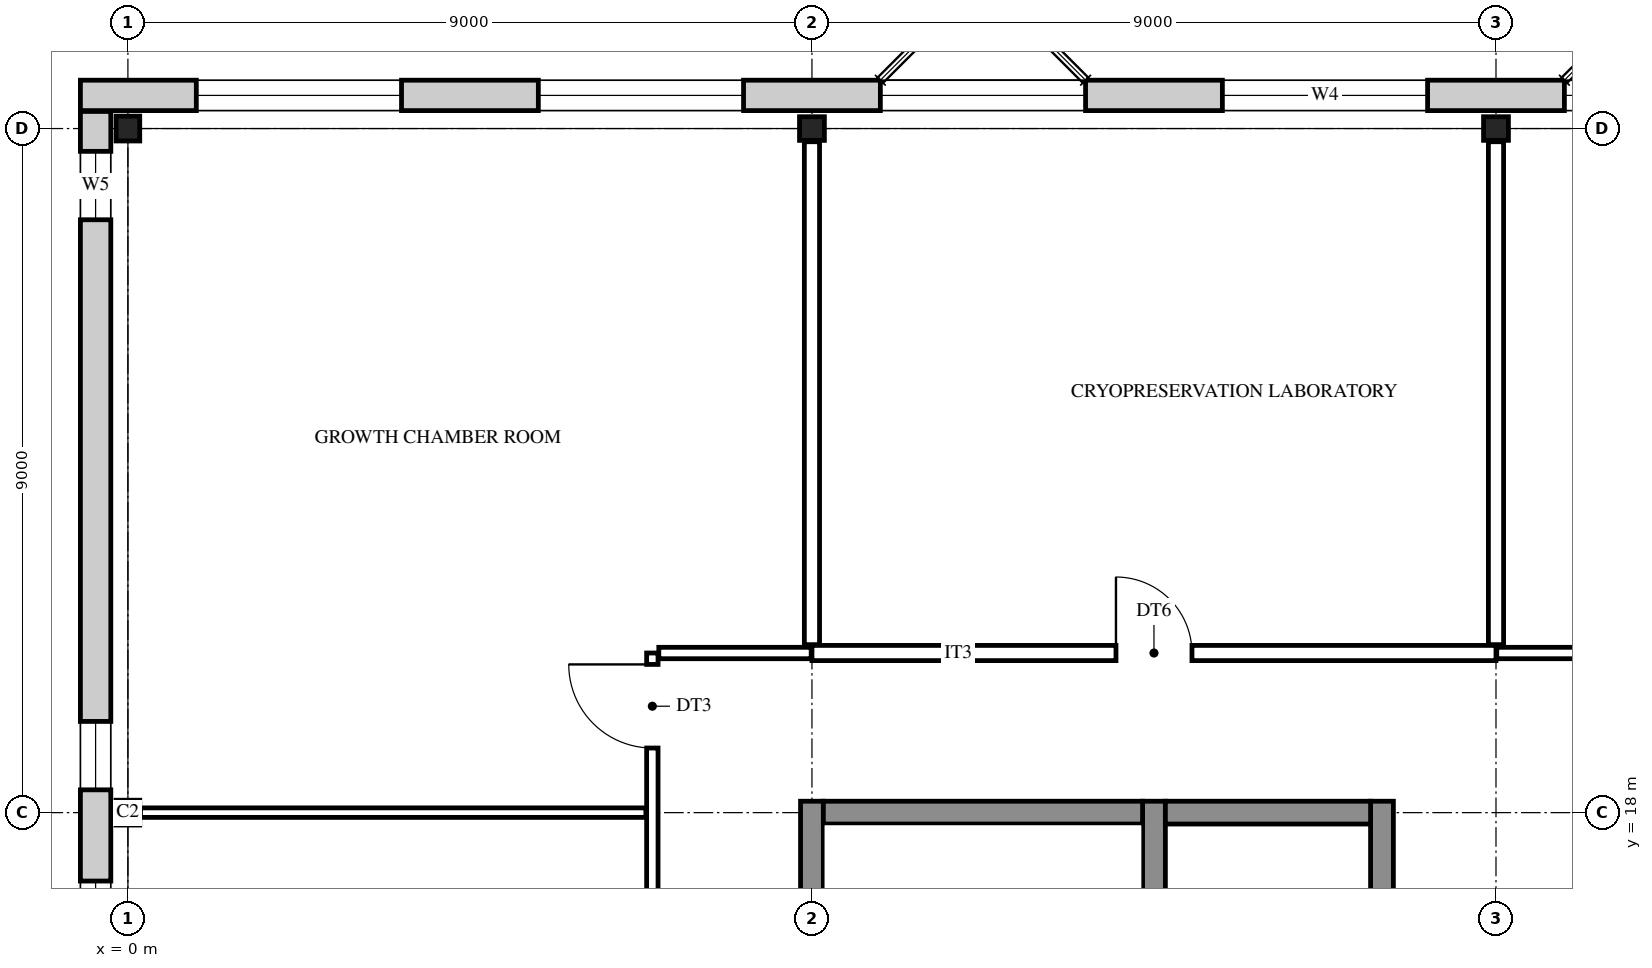
"""IFC4 building model, lengths in metres.
Left out: names, types, materials, properties, quantities, classifications, styles, units other than length and angle.
Written with IfcOpenShell. Run it as: python <this file> out.ifc"""

import sys

from ifc_helpers import new_model, si_unit, direction, frame, frame_2d, origin, origin_2d, place, context, subcontext, project, spatial, rectangle, i_section, extrude, element, fill, save


model = new_model("IFC4")
c1 = context("Model", 3, precision=1e-05, world=origin(), true_north=direction((0.0, 1.0)))
c2 = subcontext(c1, "Body", "Model", "MODEL_VIEW")
j1 = project(units=[si_unit("LENGTHUNIT", "METRE"), si_unit("PLANEANGLEUNIT", "RADIAN")], contexts=[c1])
p1 = place(None, origin())
s1 = spatial("IfcSite", under=j1, at=p1, CompositionType="ELEMENT")
p2 = place(p1, origin())
s2 = spatial("IfcBuilding", under=s1, at=p2, CompositionType="ELEMENT")
p3 = place(p2, frame((0.0, 0.0, 23.4)))
s3 = spatial("IfcBuildingStorey", under=s2, at=p3, CompositionType="ELEMENT", Elevation=23.4)
for number, where, z_axis, x_axis in (
    (1, (0.0, 18.0, 0.0), (0.0, 0.0, 1.0), (1.0, 0.0, 0.0)),
    (2, (0.0, 27.0, 0.0), (0.0, 0.0, 1.0), (1.0, 0.0, 0.0)),
    (3, (9.0, 27.0, 0.0), (0.0, 0.0, 1.0), (0.0, 1.0, 0.0)),
    (4, (18.0, 27.0, 0.0), (0.0, 0.0, 1.0), (0.0, 1.0, 0.0)),
):
    element("IfcColumn", number, at=place(p3, frame(where, z_axis=z_axis, x_axis=x_axis)), inside=s3, PredefinedType="COLUMN", context=c2, shape_type="SweptSolid", body=[
        extrude(i_section(OverallWidth=0.311, OverallDepth=0.327, WebThickness=0.016, FlangeThickness=0.025, FilletRadius=0.017, at=origin_2d()), origin(), (0.0, 0.0, 1.0), 4.2),
    ])
for number, where, z_axis, x_axis in (
    (5, (9.0, 8.85, 0.0), (0.0, 0.0, 1.0), (0.0, 1.0, 0.0)),
    (6, (13.5, 8.85, 0.0), (0.0, 0.0, 1.0), (0.0, 1.0, 0.0)),
):
    element("IfcWall", number, at=place(p3, frame(where, z_axis=z_axis, x_axis=x_axis)), inside=s3, PredefinedType="SHEAR", context=c2, shape_type="SweptSolid", body=[
        extrude(rectangle(XDim=9.3, YDim=0.3, at=frame_2d((4.65, 0.0))), origin(), (0.0, 0.0, 1.0), 4.2),
    ])
p4 = place(p3, frame((16.5, 8.85, 0.0), z_axis=(0.0, 0.0, 1.0), x_axis=(0.0, 1.0, 0.0)))
e7 = element("IfcWall", 7, at=p4, inside=s3, PredefinedType="SHEAR", context=c2, shape_type="SweptSolid", body=[
    extrude(rectangle(XDim=9.3, YDim=0.3, at=frame_2d((4.65, 0.0))), origin(), (0.0, 0.0, 1.0), 4.2),
])
p5 = place(p4, frame((1.1, 0.0, 0.0)))
e8 = element("IfcOpeningElement", 8, at=p5, cuts=e7, PredefinedType="OPENING", context=c2, shape_type="SweptSolid", body=[
    extrude(rectangle(XDim=1.1, YDim=2.1, at=frame_2d((0.55, 1.05))), frame((0.0, 0.16, 0.0), z_axis=(0.0, -1.0, 0.0), x_axis=(1.0, 0.0, 0.0)), (0.0, 0.0, 1.0), 0.32),
])
p6 = place(p4, frame((4.1, 0.0, 0.0)))
e9 = element("IfcOpeningElement", 9, at=p6, cuts=e7, PredefinedType="OPENING", context=c2, shape_type="SweptSolid", body=[
    extrude(rectangle(XDim=1.1, YDim=2.1, at=frame_2d((0.55, 1.05))), frame((0.0, 0.16, 0.0), z_axis=(0.0, -1.0, 0.0), x_axis=(1.0, 0.0, 0.0)), (0.0, 0.0, 1.0), 0.32),
])
p7 = place(p3, frame((9.15, 18.0, 0.0), z_axis=(0.0, 0.0, 1.0), x_axis=(1.0, 0.0, 0.0)))
e10 = element("IfcWall", 10, at=p7, inside=s3, PredefinedType="SHEAR", context=c2, shape_type="SweptSolid", body=[
    extrude(rectangle(XDim=4.2, YDim=0.3, at=frame_2d((2.1, 0.0))), origin(), (0.0, 0.0, 1.0), 4.2),
])
p8 = place(p3, frame((13.65, 18.0, 0.0), z_axis=(0.0, 0.0, 1.0), x_axis=(1.0, 0.0, 0.0)))
e11 = element("IfcWall", 11, at=p8, inside=s3, PredefinedType="SHEAR", context=c2, shape_type="SweptSolid", body=[
    extrude(rectangle(XDim=2.7, YDim=0.3, at=frame_2d((1.35, 0.0))), origin(), (0.0, 0.0, 1.0), 4.2),
])
p9 = place(p3, frame((-0.425, -0.225, 0.0), z_axis=(0.0, 0.0, 1.0), x_axis=(0.0, 1.0, 0.0)))
e12 = element("IfcWall", 12, at=p9, inside=s3, PredefinedType="STANDARD", context=c2, shape_type="SweptSolid", body=[
    extrude(rectangle(XDim=27.45, YDim=0.4, at=frame_2d((13.725, 0.0))), origin(), (0.0, 0.0, 1.0), 4.2),
])
p10 = place(p9, frame((0.525, 0.0, 0.9)))
e13 = element("IfcOpeningElement", 13, at=p10, cuts=e12, PredefinedType="OPENING", context=c2, shape_type="SweptSolid", body=[
    extrude(rectangle(XDim=0.9, YDim=2.0, at=frame_2d((0.45, 1.0))), frame((0.0, 0.21, 0.0), z_axis=(0.0, -1.0, 0.0), x_axis=(1.0, 0.0, 0.0)), (0.0, 0.0, 1.0), 0.42),
])
p11 = place(p9, frame((8.025, 0.0, 0.9)))
e14 = element("IfcOpeningElement", 14, at=p11, cuts=e12, PredefinedType="OPENING", context=c2, shape_type="SweptSolid", body=[
    extrude(rectangle(XDim=0.9, YDim=2.0, at=frame_2d((0.45, 1.0))), frame((0.0, 0.21, 0.0), z_axis=(0.0, -1.0, 0.0), x_axis=(1.0, 0.0, 0.0)), (0.0, 0.0, 1.0), 0.42),
])
p12 = place(p9, frame((10.125, 0.0, 0.9)))
e15 = element("IfcOpeningElement", 15, at=p12, cuts=e12, PredefinedType="OPENING", context=c2, shape_type="SweptSolid", body=[
    extrude(rectangle(XDim=2.7, YDim=2.5, at=frame_2d((1.35, 1.25))), frame((0.0, 0.21, 0.0), z_axis=(0.0, -1.0, 0.0), x_axis=(1.0, 0.0, 0.0)), (0.0, 0.0, 1.0), 0.42),
])
p13 = place(p9, frame((14.625, 0.0, 0.9)))
e16 = element("IfcOpeningElement", 16, at=p13, cuts=e12, PredefinedType="OPENING", context=c2, shape_type="SweptSolid", body=[
    extrude(rectangle(XDim=2.7, YDim=2.5, at=frame_2d((1.35, 1.25))), frame((0.0, 0.21, 0.0), z_axis=(0.0, -1.0, 0.0), x_axis=(1.0, 0.0, 0.0)), (0.0, 0.0, 1.0), 0.42),
])
p14 = place(p9, frame((18.525, 0.0, 0.9)))
e17 = element("IfcOpeningElement", 17, at=p14, cuts=e12, PredefinedType="OPENING", context=c2, shape_type="SweptSolid", body=[
    extrude(rectangle(XDim=0.9, YDim=2.0, at=frame_2d((0.45, 1.0))), frame((0.0, 0.21, 0.0), z_axis=(0.0, -1.0, 0.0), x_axis=(1.0, 0.0, 0.0)), (0.0, 0.0, 1.0), 0.42),
])
p15 = place(p9, frame((26.025, 0.0, 0.9)))
e18 = element("IfcOpeningElement", 18, at=p15, cuts=e12, PredefinedType="OPENING", context=c2, shape_type="SweptSolid", body=[
    extrude(rectangle(XDim=0.9, YDim=2.0, at=frame_2d((0.45, 1.0))), frame((0.0, 0.21, 0.0), z_axis=(0.0, -1.0, 0.0), x_axis=(1.0, 0.0, 0.0)), (0.0, 0.0, 1.0), 0.42),
])
p16 = place(p3, frame((-0.625, 27.436, 0.0), z_axis=(0.0, 0.0, 1.0), x_axis=(1.0, 0.0, 0.0)))
e19 = element("IfcWall", 19, at=p16, inside=s3, PredefinedType="STANDARD", context=c2, shape_type="SweptSolid", body=[
    extrude(rectangle(XDim=32.75, YDim=0.4, at=frame_2d((16.375, 0.0))), origin(), (0.0, 0.0, 1.0), 4.2),
])
p17 = place(p16, frame((1.525, 0.0, 0.9)))
e20 = element("IfcOpeningElement", 20, at=p17, cuts=e19, PredefinedType="OPENING", context=c2, shape_type="SweptSolid", body=[
    extrude(rectangle(XDim=2.7, YDim=2.5, at=frame_2d((1.35, 1.25))), frame((0.0, 0.21, 0.0), z_axis=(0.0, -1.0, 0.0), x_axis=(1.0, 0.0, 0.0)), (0.0, 0.0, 1.0), 0.42),
])
p18 = place(p16, frame((6.025, 0.0, 0.9)))
e21 = element("IfcOpeningElement", 21, at=p18, cuts=e19, PredefinedType="OPENING", context=c2, shape_type="SweptSolid", body=[
    extrude(rectangle(XDim=2.7, YDim=2.5, at=frame_2d((1.35, 1.25))), frame((0.0, 0.21, 0.0), z_axis=(0.0, -1.0, 0.0), x_axis=(1.0, 0.0, 0.0)), (0.0, 0.0, 1.0), 0.42),
])
p19 = place(p16, frame((10.525, 0.0, 0.9)))
e22 = element("IfcOpeningElement", 22, at=p19, cuts=e19, PredefinedType="OPENING", context=c2, shape_type="SweptSolid", body=[
    extrude(rectangle(XDim=2.7, YDim=2.5, at=frame_2d((1.35, 1.25))), frame((0.0, 0.21, 0.0), z_axis=(0.0, -1.0, 0.0), x_axis=(1.0, 0.0, 0.0)), (0.0, 0.0, 1.0), 0.42),
])
p20 = place(p16, frame((15.025, 0.0, 0.9)))
e23 = element("IfcOpeningElement", 23, at=p20, cuts=e19, PredefinedType="OPENING", context=c2, shape_type="SweptSolid", body=[
    extrude(rectangle(XDim=2.7, YDim=2.5, at=frame_2d((1.35, 1.25))), frame((0.0, 0.21, 0.0), z_axis=(0.0, -1.0, 0.0), x_axis=(1.0, 0.0, 0.0)), (0.0, 0.0, 1.0), 0.42),
])
p21 = place(p16, frame((19.525, 0.0, 0.9)))
e24 = element("IfcOpeningElement", 24, at=p21, cuts=e19, PredefinedType="OPENING", context=c2, shape_type="SweptSolid", body=[
    extrude(rectangle(XDim=2.7, YDim=2.5, at=frame_2d((1.35, 1.25))), frame((0.0, 0.21, 0.0), z_axis=(0.0, -1.0, 0.0), x_axis=(1.0, 0.0, 0.0)), (0.0, 0.0, 1.0), 0.42),
])
p22 = place(p16, frame((24.025, 0.0, 0.9)))
e25 = element("IfcOpeningElement", 25, at=p22, cuts=e19, PredefinedType="OPENING", context=c2, shape_type="SweptSolid", body=[
    extrude(rectangle(XDim=2.7, YDim=2.5, at=frame_2d((1.35, 1.25))), frame((0.0, 0.21, 0.0), z_axis=(0.0, -1.0, 0.0), x_axis=(1.0, 0.0, 0.0)), (0.0, 0.0, 1.0), 0.42),
])
p23 = place(p16, frame((28.525, 0.0, 0.9)))
e26 = element("IfcOpeningElement", 26, at=p23, cuts=e19, PredefinedType="OPENING", context=c2, shape_type="SweptSolid", body=[
    extrude(rectangle(XDim=2.7, YDim=2.5, at=frame_2d((1.35, 1.25))), frame((0.0, 0.21, 0.0), z_axis=(0.0, -1.0, 0.0), x_axis=(1.0, 0.0, 0.0)), (0.0, 0.0, 1.0), 0.42),
])
p24 = place(p3, frame((6.9, 6.985, 0.0), z_axis=(0.0, 0.0, 1.0), x_axis=(0.0, 1.0, 0.0)))
e27 = element("IfcWall", 27, at=p24, inside=s3, PredefinedType="PARTITIONING", context=c2, shape_type="SweptSolid", body=[
    extrude(rectangle(XDim=13.115, YDim=0.15, at=frame_2d((6.558, 0.0))), origin(), (0.0, 0.0, 1.0), 3.537),
])
p25 = place(p24, frame((11.865, 0.0, 0.0)))
e28 = element("IfcOpeningElement", 28, at=p25, cuts=e27, PredefinedType="OPENING", context=c2, shape_type="SweptSolid", body=[
    extrude(rectangle(XDim=1.1, YDim=2.1, at=frame_2d((0.55, 1.05))), frame((0.0, 0.085, 0.0), z_axis=(0.0, -1.0, 0.0), x_axis=(1.0, 0.0, 0.0)), (0.0, 0.0, 1.0), 0.17),
])
p26 = place(p24, frame((3.765, 0.0, 0.0)))
e29 = element("IfcOpeningElement", 29, at=p26, cuts=e27, PredefinedType="OPENING", context=c2, shape_type="SweptSolid", body=[
    extrude(rectangle(XDim=1.0, YDim=2.1, at=frame_2d((0.5, 1.05))), frame((0.0, 0.085, 0.0), z_axis=(0.0, -1.0, 0.0), x_axis=(1.0, 0.0, 0.0)), (0.0, 0.0, 1.0), 0.17),
])
p27 = place(p24, frame((8.265, 0.0, 0.0)))
e30 = element("IfcOpeningElement", 30, at=p27, cuts=e27, PredefinedType="OPENING", context=c2, shape_type="SweptSolid", body=[
    extrude(rectangle(XDim=1.0, YDim=2.1, at=frame_2d((0.5, 1.05))), frame((0.0, 0.085, 0.0), z_axis=(0.0, -1.0, 0.0), x_axis=(1.0, 0.0, 0.0)), (0.0, 0.0, 1.0), 0.17),
])
for number, where, z_axis, x_axis in (
    (31, (9.0, 20.21, 0.0), (0.0, 0.0, 1.0), (0.0, 1.0, 0.0)),
    (32, (18.0, 20.21, 0.0), (0.0, 0.0, 1.0), (0.0, 1.0, 0.0)),
):
    element("IfcWall", number, at=place(p3, frame(where, z_axis=z_axis, x_axis=x_axis)), inside=s3, PredefinedType="PARTITIONING", context=c2, shape_type="SweptSolid", body=[
        extrude(rectangle(XDim=6.616, YDim=0.2, at=frame_2d((3.308, 0.0))), origin(), (0.0, 0.0, 1.0), 3.537),
    ])
p28 = place(p3, frame((0.166, 18.0, 0.0), z_axis=(0.0, 0.0, 1.0), x_axis=(1.0, 0.0, 0.0)))
e33 = element("IfcWall", 33, at=p28, inside=s3, PredefinedType="PARTITIONING", context=c2, shape_type="SweptSolid", body=[
    extrude(rectangle(XDim=6.649, YDim=0.125, at=frame_2d((3.325, 0.0))), origin(), (0.0, 0.0, 1.0), 3.537),
])
p29 = place(p3, frame((6.985, 20.1, 0.0), z_axis=(0.0, 0.0, 1.0), x_axis=(1.0, 0.0, 0.0)))
e34 = element("IfcWall", 34, at=p29, inside=s3, PredefinedType="PARTITIONING", context=c2, shape_type="SweptSolid", body=[
    extrude(rectangle(XDim=2.005, YDim=0.15, at=frame_2d((1.002, 0.0))), origin(), (0.0, 0.0, 1.0), 3.537),
])
p30 = place(p3, frame((9.0, 20.1, 0.0), z_axis=(0.0, 0.0, 1.0), x_axis=(1.0, 0.0, 0.0)))
e35 = element("IfcWall", 35, at=p30, inside=s3, PredefinedType="PARTITIONING", context=c2, shape_type="SweptSolid", body=[
    extrude(rectangle(XDim=9.0, YDim=0.2, at=frame_2d((4.5, 0.0))), origin(), (0.0, 0.0, 1.0), 3.537),
])
p31 = place(p30, frame((4.0, 0.0, 0.0)))
e36 = element("IfcOpeningElement", 36, at=p31, cuts=e35, PredefinedType="OPENING", context=c2, shape_type="SweptSolid", body=[
    extrude(rectangle(XDim=1.0, YDim=2.1, at=frame_2d((0.5, 1.05))), frame((0.0, 0.11, 0.0), z_axis=(0.0, -1.0, 0.0), x_axis=(1.0, 0.0, 0.0)), (0.0, 0.0, 1.0), 0.22),
])
p32 = place(p3, frame((18.01, 20.1, 0.0), z_axis=(0.0, 0.0, 1.0), x_axis=(1.0, 0.0, 0.0)))
e37 = element("IfcWall", 37, at=p32, inside=s3, PredefinedType="PARTITIONING", context=c2, shape_type="SweptSolid", body=[
    extrude(rectangle(XDim=8.99, YDim=0.15, at=frame_2d((4.495, 0.0))), origin(), (0.0, 0.0, 1.0), 3.537),
])
p33 = place(p32, frame((5.14, 0.0, 0.0)))
e38 = element("IfcOpeningElement", 38, at=p33, cuts=e37, PredefinedType="OPENING", context=c2, shape_type="SweptSolid", body=[
    extrude(rectangle(XDim=1.1, YDim=2.1, at=frame_2d((0.55, 1.05))), frame((0.0, 0.085, 0.0), z_axis=(0.0, -1.0, 0.0), x_axis=(1.0, 0.0, 0.0)), (0.0, 0.0, 1.0), 0.17),
])
p34 = place(p13, origin())
e39 = element("IfcWindow", 39, at=p34, inside=s3, PartitioningType="SINGLE_PANEL", PredefinedType="WINDOW", context=c2, shape_type="SweptSolid", body=[
    extrude(rectangle(XDim=2.7, YDim=2.5, at=frame_2d((1.35, 1.25))), frame((0.0, 0.03, 0.0), z_axis=(0.0, -1.0, 0.0), x_axis=(1.0, 0.0, 0.0)), (0.0, 0.0, 1.0), 0.06),
])
fill(e16, e39)
p35 = place(p14, origin())
e40 = element("IfcWindow", 40, at=p35, inside=s3, PartitioningType="SINGLE_PANEL", PredefinedType="WINDOW", context=c2, shape_type="SweptSolid", body=[
    extrude(rectangle(XDim=0.9, YDim=2.0, at=frame_2d((0.45, 1.0))), frame((0.0, 0.03, 0.0), z_axis=(0.0, -1.0, 0.0), x_axis=(1.0, 0.0, 0.0)), (0.0, 0.0, 1.0), 0.06),
])
fill(e17, e40)
p36 = place(p15, origin())
e41 = element("IfcWindow", 41, at=p36, inside=s3, PartitioningType="SINGLE_PANEL", PredefinedType="WINDOW", context=c2, shape_type="SweptSolid", body=[
    extrude(rectangle(XDim=0.9, YDim=2.0, at=frame_2d((0.45, 1.0))), frame((0.0, 0.03, 0.0), z_axis=(0.0, -1.0, 0.0), x_axis=(1.0, 0.0, 0.0)), (0.0, 0.0, 1.0), 0.06),
])
fill(e18, e41)
p37 = place(p17, origin())
e42 = element("IfcWindow", 42, at=p37, inside=s3, PartitioningType="SINGLE_PANEL", PredefinedType="WINDOW", context=c2, shape_type="SweptSolid", body=[
    extrude(rectangle(XDim=2.7, YDim=2.5, at=frame_2d((1.35, 1.25))), frame((0.0, 0.03, 0.0), z_axis=(0.0, -1.0, 0.0), x_axis=(1.0, 0.0, 0.0)), (0.0, 0.0, 1.0), 0.06),
])
fill(e20, e42)
p38 = place(p18, origin())
e43 = element("IfcWindow", 43, at=p38, inside=s3, PartitioningType="SINGLE_PANEL", PredefinedType="WINDOW", context=c2, shape_type="SweptSolid", body=[
    extrude(rectangle(XDim=2.7, YDim=2.5, at=frame_2d((1.35, 1.25))), frame((0.0, 0.03, 0.0), z_axis=(0.0, -1.0, 0.0), x_axis=(1.0, 0.0, 0.0)), (0.0, 0.0, 1.0), 0.06),
])
fill(e21, e43)
p39 = place(p19, origin())
e44 = element("IfcWindow", 44, at=p39, inside=s3, PartitioningType="SINGLE_PANEL", PredefinedType="WINDOW", context=c2, shape_type="SweptSolid", body=[
    extrude(rectangle(XDim=2.7, YDim=2.5, at=frame_2d((1.35, 1.25))), frame((0.0, 0.03, 0.0), z_axis=(0.0, -1.0, 0.0), x_axis=(1.0, 0.0, 0.0)), (0.0, 0.0, 1.0), 0.06),
])
fill(e22, e44)
p40 = place(p20, origin())
e45 = element("IfcWindow", 45, at=p40, inside=s3, PartitioningType="SINGLE_PANEL", PredefinedType="WINDOW", context=c2, shape_type="SweptSolid", body=[
    extrude(rectangle(XDim=2.7, YDim=2.5, at=frame_2d((1.35, 1.25))), frame((0.0, 0.03, 0.0), z_axis=(0.0, -1.0, 0.0), x_axis=(1.0, 0.0, 0.0)), (0.0, 0.0, 1.0), 0.06),
])
fill(e23, e45)
p41 = place(p21, origin())
e46 = element("IfcWindow", 46, at=p41, inside=s3, PartitioningType="SINGLE_PANEL", PredefinedType="WINDOW", context=c2, shape_type="SweptSolid", body=[
    extrude(rectangle(XDim=2.7, YDim=2.5, at=frame_2d((1.35, 1.25))), frame((0.0, 0.03, 0.0), z_axis=(0.0, -1.0, 0.0), x_axis=(1.0, 0.0, 0.0)), (0.0, 0.0, 1.0), 0.06),
])
fill(e24, e46)
p42 = place(p25, origin())
e47 = element("IfcDoor", 47, at=p42, inside=s3, OperationType="SINGLE_SWING_RIGHT", PredefinedType="DOOR", context=c2, shape_type="SweptSolid", body=[
    extrude(rectangle(XDim=1.1, YDim=2.1, at=frame_2d((0.55, 1.05))), frame((0.0, 0.025, 0.0), z_axis=(0.0, -1.0, 0.0), x_axis=(1.0, 0.0, 0.0)), (0.0, 0.0, 1.0), 0.05),
])
fill(e28, e47)
p43 = place(p31, origin())
e48 = element("IfcDoor", 48, at=p43, inside=s3, OperationType="SINGLE_SWING_LEFT", PredefinedType="DOOR", context=c2, shape_type="SweptSolid", body=[
    extrude(rectangle(XDim=1.0, YDim=2.1, at=frame_2d((0.5, 1.05))), frame((0.0, 0.025, 0.0), z_axis=(0.0, -1.0, 0.0), x_axis=(1.0, 0.0, 0.0)), (0.0, 0.0, 1.0), 0.05),
])
fill(e36, e48)
save(model, sys.argv[1])
